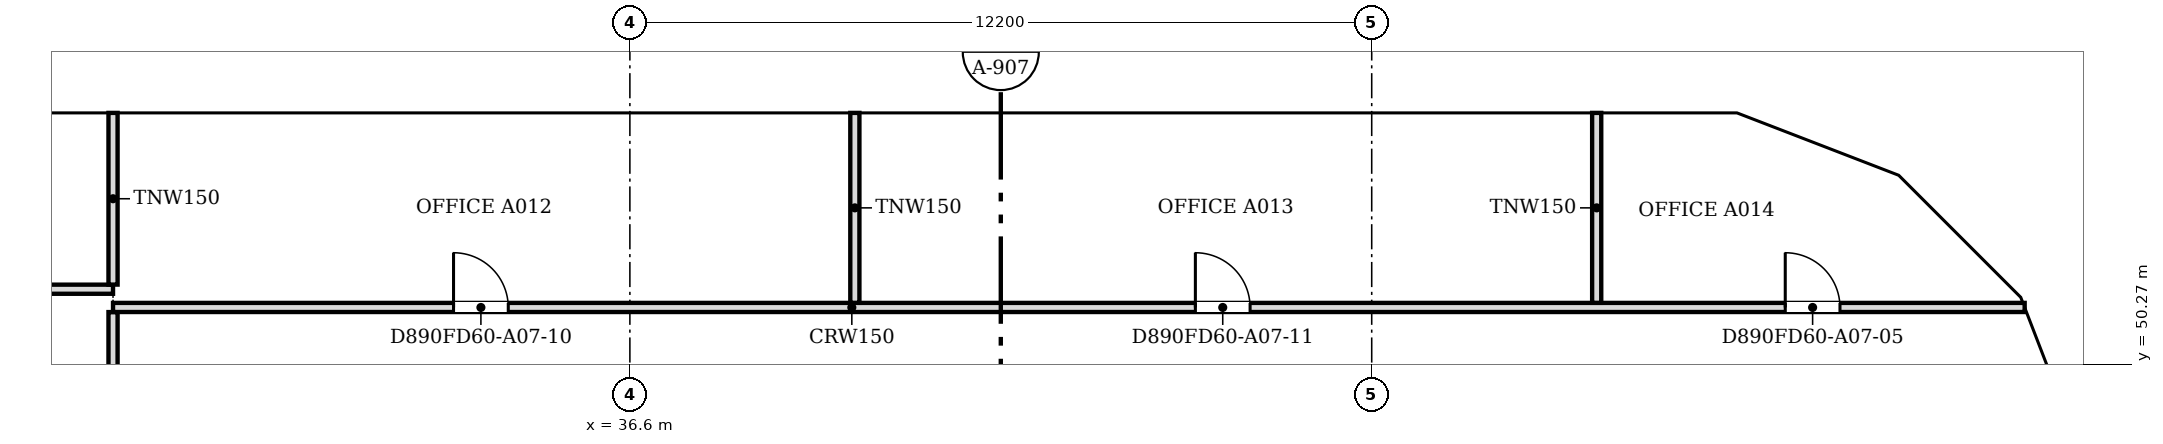
"""IFC4 building model, lengths in metres.
Left out: names, types, materials, properties, quantities, classifications, styles, units other than length and angle.
Written with IfcOpenShell. Run it as: python <this file> out.ifc"""

import sys

from ifc_helpers import new_model, si_unit, direction, frame, frame_2d, origin, place, context, subcontext, project, spatial, polyline, rectangle, outline, extrude, faceted_brep, source, transform, mapped, element, fill, save


model = new_model("IFC4")
c1 = context("Model", 3, precision=1e-05, world=origin(), true_north=direction((0.0, 1.0)))
c2 = subcontext(c1, "Body", "Model", "MODEL_VIEW")
j1 = project(units=[si_unit("LENGTHUNIT", "METRE"), si_unit("PLANEANGLEUNIT", "RADIAN")], contexts=[c1])
p1 = place(None, origin())
s1 = spatial("IfcSite", under=j1, at=p1, CompositionType="ELEMENT")
p2 = place(p1, origin())
s2 = spatial("IfcBuilding", under=s1, at=p2, CompositionType="ELEMENT")
p3 = place(p2, frame((0.0, 0.0, 80.0)))
s3 = spatial("IfcBuildingStorey", under=s2, at=p3, CompositionType="ELEMENT", Elevation=80.0)
m1 = source(origin(), c2, "Body", "Brep", [
    faceted_brep([(0.047, -0.25, 0.0), (2.997, -0.25, 3.8), (0.047, -0.25, 7.6), (0.0, -0.25, 7.541), (0.0, -0.25, 0.059), (0.093, 0.25, 7.54), (2.944, 0.25, 3.868), (2.944, 0.25, 3.732), (0.093, 0.25, 0.06), (2.997, 0.0, 3.8), (0.047, 0.0, 0.0), (0.047, 0.0, 7.6)], [[[0, 1, 2, 3, 4]], [[5, 6, 7, 8]], [[8, 7, 9, 1, 0, 10]], [[6, 5, 11, 2, 1, 9]], [[3, 2, 11]], [[10, 0, 4]], [[8, 10, 4, 3, 11, 5]], [[9, 7, 6]]]),
])
p4 = place(p3, frame((60.767, 48.71, -3.8), z_axis=(0.0, 0.0, 1.0), x_axis=(-0.359901446078, 0.932990326376, 0.0)))
e1 = element("IfcWall", 1, at=p4, inside=s3, PredefinedType="SOLIDWALL", context=c2, shape_type="MappedRepresentation", body=[
    mapped(m1, transform((0.0, 0.0, 0.0), scale=1.0)),
])
m2 = source(origin(), c2, "Body", "SweptSolid", [
    extrude(outline(polyline([(0.247, 0.665), (2.681, 3.8), (0.247, 6.935), (0.247, 0.665)])), frame((0.0, 0.26, 0.0), z_axis=(0.0, -1.0, 0.0), x_axis=(1.0, 0.0, 0.0)), (0.0, 0.0, 1.0), 0.52),
])
p5 = place(p4, origin())
e2 = element("IfcOpeningElement", 2, at=p5, cuts=e1, PredefinedType="OPENING", context=c2, shape_type="MappedRepresentation", body=[
    mapped(m2, transform((0.0, 0.0, 0.0), scale=1.0)),
])
m3 = source(origin(), c2, "Body", "Brep", [
    faceted_brep([(2.944, -0.25, 0.0), (2.997, -0.25, 0.068), (2.997, -0.25, 7.532), (2.944, -0.25, 7.6), (0.0, -0.25, 3.8), (0.053, 0.25, 3.868), (2.891, 0.25, 7.532), (2.891, 0.25, 0.068), (0.053, 0.25, 3.732), (2.944, 0.0, 0.0), (2.944, 0.0, 7.6), (0.0, 0.0, 3.8)], [[[0, 1, 2, 3, 4]], [[5, 6, 7, 8]], [[1, 0, 9]], [[10, 3, 2]], [[6, 5, 11, 4, 3, 10]], [[8, 7, 9, 0, 4, 11]], [[8, 11, 5]], [[1, 9, 7, 6, 10, 2]]]),
])
p6 = place(p3, frame((59.688, 51.506, -3.8), z_axis=(0.0, 0.0, 1.0), x_axis=(-0.707106781187, 0.707106781187, 0.0)))
e3 = element("IfcWall", 3, at=p6, inside=s3, PredefinedType="SOLIDWALL", context=c2, shape_type="MappedRepresentation", body=[
    mapped(m3, transform((0.0, 0.0, 0.0), scale=1.0)),
])
m4 = source(origin(), c2, "Body", "SweptSolid", [
    extrude(outline(polyline([(2.744, 6.934), (0.316, 3.8), (2.744, 0.666), (2.744, 6.934)])), frame((0.0, 0.26, 0.0), z_axis=(0.0, -1.0, 0.0), x_axis=(1.0, 0.0, 0.0)), (0.0, 0.0, 1.0), 0.52),
])
p7 = place(p6, origin())
e4 = element("IfcOpeningElement", 4, at=p7, cuts=e3, PredefinedType="OPENING", context=c2, shape_type="MappedRepresentation", body=[
    mapped(m4, transform((0.0, 0.0, 0.0), scale=1.0)),
])
m5 = source(origin(), c2, "Body", "Brep", [
    faceted_brep([(0.053, -0.25, 0.0), (3.003, -0.25, 3.8), (0.053, -0.25, 7.6), (0.0, -0.25, 7.532), (0.0, -0.25, 0.068), (0.106, 0.25, 7.532), (2.957, 0.25, 3.86), (2.957, 0.25, 3.74), (0.106, 0.25, 0.068), (3.003, 0.0, 3.8), (0.053, 0.0, 0.0), (0.053, 0.0, 7.6)], [[[0, 1, 2, 3, 4]], [[5, 6, 7, 8]], [[8, 7, 9, 1, 0, 10]], [[6, 5, 11, 2, 1, 9]], [[3, 2, 11]], [[10, 0, 4]], [[8, 10, 4, 3, 11, 5]], [[9, 7, 6]]]),
])
p8 = place(p3, frame((57.656, 53.569, -3.8), z_axis=(0.0, 0.0, 1.0), x_axis=(-0.933007896601, 0.359855894603, 0.0)))
e5 = element("IfcWall", 5, at=p8, inside=s3, PredefinedType="SOLIDWALL", context=c2, shape_type="MappedRepresentation", body=[
    mapped(m5, transform((0.0, 0.0, 0.0), scale=1.0)),
])
m6 = source(origin(), c2, "Body", "SweptSolid", [
    extrude(outline(polyline([(0.253, 0.665), (2.687, 3.8), (0.253, 6.935), (0.253, 0.665)])), frame((0.0, 0.26, 0.0), z_axis=(0.0, -1.0, 0.0), x_axis=(1.0, 0.0, 0.0)), (0.0, 0.0, 1.0), 0.52),
])
p9 = place(p8, origin())
e6 = element("IfcOpeningElement", 6, at=p9, cuts=e5, PredefinedType="OPENING", context=c2, shape_type="MappedRepresentation", body=[
    mapped(m6, transform((0.0, 0.0, 0.0), scale=1.0)),
])
m7 = source(origin(), c2, "Body", "Brep", [
    faceted_brep([(3.003, -0.25, 0.0), (6.053, -0.25, 3.8), (3.003, -0.25, 7.6), (0.0, -0.25, 3.8), (0.047, 0.25, 3.859), (3.003, 0.25, 7.6), (6.053, 0.25, 3.8), (3.003, 0.25, 0.0), (0.047, 0.25, 3.741), (0.0, 0.0, 3.8)], [[[0, 1, 2, 3]], [[4, 5, 6, 7, 8]], [[7, 6, 1, 0]], [[6, 5, 2, 1]], [[5, 4, 9, 3, 2]], [[8, 7, 0, 3, 9]], [[8, 9, 4]]]),
])
p10 = place(p3, frame((54.854, 54.65, -3.8), z_axis=(0.0, 0.0, 1.0), x_axis=(-1.0, 0.0, 0.0)))
e7 = element("IfcWall", 7, at=p10, inside=s3, PredefinedType="SOLIDWALL", context=c2, shape_type="MappedRepresentation", body=[
    mapped(m7, transform((0.0, 0.0, 0.0), scale=1.0)),
])
m8 = source(origin(), c2, "Body", "SweptSolid", [
    extrude(outline(polyline([(3.005, 0.401), (5.733, 3.8), (3.005, 7.199), (0.319, 3.8), (3.005, 0.401)])), frame((0.0, 0.26, 0.0), z_axis=(0.0, -1.0, 0.0), x_axis=(1.0, 0.0, 0.0)), (0.0, 0.0, 1.0), 0.52),
])
p11 = place(p10, origin())
e8 = element("IfcOpeningElement", 8, at=p11, cuts=e7, PredefinedType="OPENING", context=c2, shape_type="MappedRepresentation", body=[
    mapped(m8, transform((0.0, 0.0, 0.0), scale=1.0)),
])
m9 = source(origin(), c2, "Body", "SweptSolid", [
    extrude(outline(polyline([(3.05, 0.0), (6.1, 3.8), (3.05, 7.6), (0.0, 3.8), (3.05, 0.0)])), frame((0.0, 0.25, 0.0), z_axis=(0.0, -1.0, 0.0), x_axis=(1.0, 0.0, 0.0)), (0.0, 0.0, 1.0), 0.5),
])
p12 = place(p3, frame((48.8, 54.65, -3.8), z_axis=(0.0, 0.0, 1.0), x_axis=(-1.0, 0.0, 0.0)))
e9 = element("IfcWall", 9, at=p12, inside=s3, PredefinedType="SOLIDWALL", context=c2, shape_type="MappedRepresentation", body=[
    mapped(m9, transform((0.0, 0.0, 0.0), scale=1.0)),
])
m10 = source(origin(), c2, "Body", "SweptSolid", [
    extrude(outline(polyline([(3.05, 0.399), (5.78, 3.8), (3.05, 7.201), (0.321, 3.8), (3.05, 0.399)])), frame((0.0, 0.26, 0.0), z_axis=(0.0, -1.0, 0.0), x_axis=(1.0, 0.0, 0.0)), (0.0, 0.0, 1.0), 0.52),
])
p13 = place(p12, origin())
e10 = element("IfcOpeningElement", 10, at=p13, cuts=e9, PredefinedType="OPENING", context=c2, shape_type="MappedRepresentation", body=[
    mapped(m10, transform((0.0, 0.0, 0.0), scale=1.0)),
])
m11 = source(origin(), c2, "Body", "Brep", [
    faceted_brep([(3.05, -0.25, 0.0), (6.1, -0.25, 3.8), (6.1, -0.25, 3.8), (3.05, -0.25, 7.6), (0.0, -0.25, 3.8), (0.0, 0.25, 3.8), (3.05, 0.25, 7.6), (6.1, 0.25, 3.8), (6.1, 0.25, 3.8), (3.05, 0.25, 0.0)], [[[0, 1, 2, 3, 4]], [[5, 6, 7, 8, 9]], [[9, 8, 1, 0]], [[7, 6, 3, 2]], [[6, 5, 4, 3]], [[5, 9, 0, 4]], [[1, 8, 7, 2]]]),
])
p14 = place(p3, frame((42.7, 54.65, -3.8), z_axis=(0.0, 0.0, 1.0), x_axis=(-1.0, 0.0, 0.0)))
e11 = element("IfcWall", 11, at=p14, inside=s3, PredefinedType="SOLIDWALL", context=c2, shape_type="MappedRepresentation", body=[
    mapped(m11, transform((0.0, 0.0, 0.0), scale=1.0)),
])
p15 = place(p14, origin())
e12 = element("IfcOpeningElement", 12, at=p15, cuts=e11, PredefinedType="OPENING", context=c2, shape_type="MappedRepresentation", body=[
    mapped(m10, transform((0.0, 0.0, 0.0), scale=1.0)),
])
p16 = place(p3, frame((36.6, 54.65, -3.8), z_axis=(0.0, 0.0, 1.0), x_axis=(-1.0, 0.0, 0.0)))
e13 = element("IfcWall", 13, at=p16, inside=s3, PredefinedType="SOLIDWALL", context=c2, shape_type="MappedRepresentation", body=[
    mapped(m9, transform((0.0, 0.0, 0.0), scale=1.0)),
])
p17 = place(p16, origin())
e14 = element("IfcOpeningElement", 14, at=p17, cuts=e13, PredefinedType="OPENING", context=c2, shape_type="MappedRepresentation", body=[
    mapped(m10, transform((0.0, 0.0, 0.0), scale=1.0)),
])
p18 = place(p3, frame((30.5, 54.65, -3.8), z_axis=(0.0, 0.0, 1.0), x_axis=(-1.0, 0.0, 0.0)))
e15 = element("IfcWall", 15, at=p18, inside=s3, PredefinedType="SOLIDWALL", context=c2, shape_type="MappedRepresentation", body=[
    mapped(m9, transform((0.0, 0.0, 0.0), scale=1.0)),
])
p19 = place(p18, origin())
e16 = element("IfcOpeningElement", 16, at=p19, cuts=e15, PredefinedType="OPENING", context=c2, shape_type="MappedRepresentation", body=[
    mapped(m10, transform((0.0, 0.0, 0.0), scale=1.0)),
])
p20 = place(p2, frame((0.0, 0.0, 83.8)))
s4 = spatial("IfcBuildingStorey", under=s2, at=p20, CompositionType="ELEMENT", Elevation=83.8)
m12 = source(origin(), c2, "Body", "Brep", [
    faceted_brep([(2.95, -0.25, 0.0), (3.003, -0.25, 0.068), (3.003, -0.25, 7.532), (2.95, -0.25, 7.6), (0.0, -0.25, 3.8), (0.047, 0.25, 3.86), (2.898, 0.25, 7.532), (2.898, 0.25, 0.068), (0.047, 0.25, 3.74), (2.95, 0.0, 0.0), (2.95, 0.0, 7.6), (0.0, 0.0, 3.8)], [[[0, 1, 2, 3, 4]], [[5, 6, 7, 8]], [[1, 0, 9]], [[10, 3, 2]], [[6, 5, 11, 4, 3, 10]], [[8, 7, 9, 0, 4, 11]], [[8, 11, 5]], [[1, 9, 7, 6, 10, 2]]]),
])
p21 = place(p20, frame((60.75, 48.753, -3.8), z_axis=(0.0, 0.0, 1.0), x_axis=(-0.35992665181, 0.932980602862, 0.0)))
e17 = element("IfcWall", 17, at=p21, inside=s4, PredefinedType="SOLIDWALL", context=c2, shape_type="MappedRepresentation", body=[
    mapped(m12, transform((0.0, 0.0, 0.0), scale=1.0)),
])
m13 = source(origin(), c2, "Body", "SweptSolid", [
    extrude(outline(polyline([(2.75, 6.935), (0.316, 3.8), (2.75, 0.665), (2.75, 6.935)])), frame((0.0, 0.26, 0.0), z_axis=(0.0, -1.0, 0.0), x_axis=(1.0, 0.0, 0.0)), (0.0, 0.0, 1.0), 0.52),
])
p22 = place(p21, origin())
e18 = element("IfcOpeningElement", 18, at=p22, cuts=e17, PredefinedType="OPENING", context=c2, shape_type="MappedRepresentation", body=[
    mapped(m13, transform((0.0, 0.0, 0.0), scale=1.0)),
])
m14 = source(origin(), c2, "Body", "Brep", [
    faceted_brep([(0.053, -0.25, 0.0), (2.997, -0.25, 3.8), (0.053, -0.25, 7.6), (0.0, -0.25, 7.532), (0.0, -0.25, 0.068), (0.106, 0.25, 7.532), (2.944, 0.25, 3.868), (2.944, 0.25, 3.732), (0.106, 0.25, 0.068), (2.997, 0.0, 3.8), (0.053, 0.0, 0.0), (0.053, 0.0, 7.6)], [[[0, 1, 2, 3, 4]], [[5, 6, 7, 8]], [[8, 7, 9, 1, 0, 10]], [[6, 5, 11, 2, 1, 9]], [[3, 2, 11]], [[10, 0, 4]], [[8, 10, 4, 3, 11, 5]], [[9, 7, 6]]]),
])
p23 = place(p20, frame((59.726, 51.469, -3.8), z_axis=(0.0, 0.0, 1.0), x_axis=(-0.707106781187, 0.707106781187, 0.0)))
e19 = element("IfcWall", 19, at=p23, inside=s4, PredefinedType="SOLIDWALL", context=c2, shape_type="MappedRepresentation", body=[
    mapped(m14, transform((0.0, 0.0, 0.0), scale=1.0)),
])
m15 = source(origin(), c2, "Body", "SweptSolid", [
    extrude(outline(polyline([(0.253, 0.666), (2.681, 3.8), (0.253, 6.934), (0.253, 0.666)])), frame((0.0, 0.26, 0.0), z_axis=(0.0, -1.0, 0.0), x_axis=(1.0, 0.0, 0.0)), (0.0, 0.0, 1.0), 0.52),
])
p24 = place(p23, origin())
e20 = element("IfcOpeningElement", 20, at=p24, cuts=e19, PredefinedType="OPENING", context=c2, shape_type="MappedRepresentation", body=[
    mapped(m15, transform((0.0, 0.0, 0.0), scale=1.0)),
])
m16 = source(origin(), c2, "Body", "Brep", [
    faceted_brep([(2.95, -0.25, 0.0), (2.997, -0.25, 0.059), (2.997, -0.25, 7.541), (2.95, -0.25, 7.6), (0.0, -0.25, 3.8), (0.053, 0.25, 3.868), (2.904, 0.25, 7.54), (2.904, 0.25, 0.06), (0.053, 0.25, 3.732), (2.95, 0.0, 0.0), (2.95, 0.0, 7.6), (0.0, 0.0, 3.8)], [[[0, 1, 2, 3, 4]], [[5, 6, 7, 8]], [[1, 0, 9]], [[10, 3, 2]], [[6, 5, 11, 4, 3, 10]], [[8, 7, 9, 0, 4, 11]], [[8, 11, 5]], [[1, 9, 7, 6, 10, 2]]]),
])
p25 = place(p20, frame((57.606, 53.588, -3.8), z_axis=(0.0, 0.0, 1.0), x_axis=(-0.932990326376, 0.359901446078, 0.0)))
e21 = element("IfcWall", 21, at=p25, inside=s4, PredefinedType="SOLIDWALL", context=c2, shape_type="MappedRepresentation", body=[
    mapped(m16, transform((0.0, 0.0, 0.0), scale=1.0)),
])
p26 = place(p25, origin())
e22 = element("IfcOpeningElement", 22, at=p26, cuts=e21, PredefinedType="OPENING", context=c2, shape_type="MappedRepresentation", body=[
    mapped(m13, transform((0.0, 0.0, 0.0), scale=1.0)),
])
m17 = source(origin(), c2, "Body", "Brep", [
    faceted_brep([(0.047, -0.25, 0.0), (3.05, -0.25, 3.8), (0.047, -0.25, 7.6), (0.0, -0.25, 7.54), (0.0, -0.25, 0.06), (0.093, 0.25, 7.541), (3.05, 0.25, 3.8), (0.093, 0.25, 0.059), (0.047, 0.0, 0.0), (0.047, 0.0, 7.6)], [[[0, 1, 2, 3, 4]], [[5, 6, 7]], [[7, 6, 1, 0, 8]], [[6, 5, 9, 2, 1]], [[3, 2, 9]], [[8, 0, 4]], [[7, 8, 4, 3, 9, 5]]]),
])
p27 = place(p20, frame((54.9, 54.65, -3.8), z_axis=(0.0, 0.0, 1.0), x_axis=(-1.0, 0.0, 0.0)))
e23 = element("IfcWall", 23, at=p27, inside=s4, PredefinedType="SOLIDWALL", context=c2, shape_type="MappedRepresentation", body=[
    mapped(m17, transform((0.0, 0.0, 0.0), scale=1.0)),
])
m18 = source(origin(), c2, "Body", "SweptSolid", [
    extrude(outline(polyline([(0.247, 0.656), (2.731, 3.8), (0.247, 6.944), (0.247, 0.656)])), frame((0.0, 0.26, 0.0), z_axis=(0.0, -1.0, 0.0), x_axis=(1.0, 0.0, 0.0)), (0.0, 0.0, 1.0), 0.52),
])
p28 = place(p27, origin())
e24 = element("IfcOpeningElement", 24, at=p28, cuts=e23, PredefinedType="OPENING", context=c2, shape_type="MappedRepresentation", body=[
    mapped(m18, transform((0.0, 0.0, 0.0), scale=1.0)),
])
p29 = place(p20, frame((51.85, 54.65, -3.8), z_axis=(0.0, 0.0, 1.0), x_axis=(-1.0, 0.0, 0.0)))
e25 = element("IfcWall", 25, at=p29, inside=s4, PredefinedType="SOLIDWALL", context=c2, shape_type="MappedRepresentation", body=[
    mapped(m9, transform((0.0, 0.0, 0.0), scale=1.0)),
])
p30 = place(p29, origin())
e26 = element("IfcOpeningElement", 26, at=p30, cuts=e25, PredefinedType="OPENING", context=c2, shape_type="MappedRepresentation", body=[
    mapped(m10, transform((0.0, 0.0, 0.0), scale=1.0)),
])
p31 = place(p20, frame((45.75, 54.65, -3.8), z_axis=(0.0, 0.0, 1.0), x_axis=(-1.0, 0.0, 0.0)))
e27 = element("IfcWall", 27, at=p31, inside=s4, PredefinedType="SOLIDWALL", context=c2, shape_type="MappedRepresentation", body=[
    mapped(m9, transform((0.0, 0.0, 0.0), scale=1.0)),
])
p32 = place(p31, origin())
e28 = element("IfcOpeningElement", 28, at=p32, cuts=e27, PredefinedType="OPENING", context=c2, shape_type="MappedRepresentation", body=[
    mapped(m10, transform((0.0, 0.0, 0.0), scale=1.0)),
])
p33 = place(p20, frame((39.65, 54.65, -3.8), z_axis=(0.0, 0.0, 1.0), x_axis=(-1.0, 0.0, 0.0)))
e29 = element("IfcWall", 29, at=p33, inside=s4, PredefinedType="SOLIDWALL", context=c2, shape_type="MappedRepresentation", body=[
    mapped(m11, transform((0.0, 0.0, 0.0), scale=1.0)),
])
p34 = place(p33, origin())
e30 = element("IfcOpeningElement", 30, at=p34, cuts=e29, PredefinedType="OPENING", context=c2, shape_type="MappedRepresentation", body=[
    mapped(m10, transform((0.0, 0.0, 0.0), scale=1.0)),
])
p35 = place(p20, frame((33.55, 54.65, -3.8), z_axis=(0.0, 0.0, 1.0), x_axis=(-1.0, 0.0, 0.0)))
e31 = element("IfcWall", 31, at=p35, inside=s4, PredefinedType="SOLIDWALL", context=c2, shape_type="MappedRepresentation", body=[
    mapped(m9, transform((0.0, 0.0, 0.0), scale=1.0)),
])
p36 = place(p35, origin())
e32 = element("IfcOpeningElement", 32, at=p36, cuts=e31, PredefinedType="OPENING", context=c2, shape_type="MappedRepresentation", body=[
    mapped(m10, transform((0.0, 0.0, 0.0), scale=1.0)),
])
p37 = place(p20, frame((27.45, 54.65, -3.8), z_axis=(0.0, 0.0, 1.0), x_axis=(-1.0, 0.0, 0.0)))
e33 = element("IfcWall", 33, at=p37, inside=s4, PredefinedType="SOLIDWALL", context=c2, shape_type="MappedRepresentation", body=[
    mapped(m11, transform((0.0, 0.0, 0.0), scale=1.0)),
])
p38 = place(p37, origin())
e34 = element("IfcOpeningElement", 34, at=p38, cuts=e33, PredefinedType="OPENING", context=c2, shape_type="MappedRepresentation", body=[
    mapped(m10, transform((0.0, 0.0, 0.0), scale=1.0)),
])
p39 = place(p3, frame((28.1, 47.376, 0.0), z_axis=(0.0, 0.0, 1.0), x_axis=(0.0, 1.0, 0.0)))
e35 = element("IfcWall", 35, at=p39, inside=s3, PredefinedType="PARTITIONING", context=c2, shape_type="SweptSolid", body=[
    extrude(rectangle(XDim=3.748, YDim=0.15, at=frame_2d((1.874, 0.0))), origin(), (0.0, 0.0, 1.0), 3.067),
])
p40 = place(p3, frame((28.1, 51.2, 0.0), z_axis=(0.0, 0.0, 1.0), x_axis=(1.0, 0.0, 0.0)))
e36 = element("IfcWall", 36, at=p40, inside=s3, PredefinedType="PARTITIONING", context=c2, shape_type="SweptSolid", body=[
    extrude(rectangle(XDim=31.438, YDim=0.15, at=frame_2d((15.719, 0.0))), origin(), (0.0, 0.0, 1.0), 3.067),
])
m19 = source(origin(), c2, "Body", "SweptSolid", [
    extrude(rectangle(XDim=0.9, YDim=2.1, at=frame_2d((0.45, 1.05))), frame((0.0, 0.085, 0.0), z_axis=(0.0, -1.0, 0.0), x_axis=(1.0, 0.0, 0.0)), (0.0, 0.0, 1.0), 0.17),
])
p41 = place(p40, frame((27.501, 0.0, 0.0)))
e37 = element("IfcOpeningElement", 37, at=p41, cuts=e36, PredefinedType="OPENING", context=c2, shape_type="MappedRepresentation", body=[
    mapped(m19, transform((0.0, 0.0, 0.0), scale=1.0)),
])
p42 = place(p40, frame((5.6, 0.0, 0.0)))
e38 = element("IfcOpeningElement", 38, at=p42, cuts=e36, PredefinedType="OPENING", context=c2, shape_type="MappedRepresentation", body=[
    mapped(m19, transform((0.0, 0.0, 0.0), scale=1.0)),
])
p43 = place(p40, frame((17.8, 0.0, 0.0)))
e39 = element("IfcOpeningElement", 39, at=p43, cuts=e36, PredefinedType="OPENING", context=c2, shape_type="MappedRepresentation", body=[
    mapped(m19, transform((0.0, 0.0, 0.0), scale=1.0)),
])
for number, where, z_axis, x_axis in (
    (40, (40.3, 51.276, 0.0), (0.0, 0.0, 1.0), (0.0, 1.0, 0.0)),
    (41, (52.5, 51.276, 0.0), (0.0, 0.0, 1.0), (0.0, 1.0, 0.0)),
):
    element("IfcWall", number, at=place(p3, frame(where, z_axis=z_axis, x_axis=x_axis)), inside=s3, PredefinedType="PARTITIONING", context=c2, shape_type="SweptSolid", body=[
        extrude(rectangle(XDim=3.124, YDim=0.15, at=frame_2d((1.562, 0.0))), origin(), (0.0, 0.0, 1.0), 3.067),
    ])
p44 = place(p3, frame((13.6, 51.5, 0.0), z_axis=(0.0, 0.0, 1.0), x_axis=(1.0, 0.0, 0.0)))
e42 = element("IfcWall", 42, at=p44, inside=s3, PredefinedType="PARTITIONING", context=c2, shape_type="SweptSolid", body=[
    extrude(rectangle(XDim=14.5, YDim=0.15, at=frame_2d((7.25, 0.0))), origin(), (0.0, 0.0, 1.0), 3.067),
])
p45 = place(p44, frame((3.1, 0.0, 0.0)))
e43 = element("IfcOpeningElement", 43, at=p45, cuts=e42, PredefinedType="OPENING", context=c2, shape_type="MappedRepresentation", body=[
    mapped(m19, transform((0.0, 0.0, 0.0), scale=1.0)),
])
p46 = place(p44, frame((10.305, 0.0, 0.0)))
e44 = element("IfcOpeningElement", 44, at=p46, cuts=e42, PredefinedType="OPENING", context=c2, shape_type="MappedRepresentation", body=[
    mapped(m19, transform((0.0, 0.0, 0.0), scale=1.0)),
])
p47 = place(p3, frame((28.1, 51.576, 0.0), z_axis=(0.0, 0.0, 1.0), x_axis=(0.0, 1.0, 0.0)))
e45 = element("IfcWall", 45, at=p47, inside=s3, PredefinedType="PARTITIONING", context=c2, shape_type="SweptSolid", body=[
    extrude(rectangle(XDim=2.824, YDim=0.15, at=frame_2d((1.412, 0.0))), origin(), (0.0, 0.0, 1.0), 3.067),
])
m20 = source(origin(), c2, "Body", "SweptSolid", [
    extrude(rectangle(XDim=0.9, YDim=2.1, at=frame_2d((0.45, 1.05))), frame((0.0, 0.025, 0.0), z_axis=(0.0, -1.0, 0.0), x_axis=(1.0, 0.0, 0.0)), (0.0, 0.0, 1.0), 0.05),
])
p48 = place(p41, origin())
e46 = element("IfcDoor", 46, at=p48, inside=s3, OperationType="SINGLE_SWING_LEFT", PredefinedType="DOOR", context=c2, shape_type="MappedRepresentation", body=[
    mapped(m20, transform((0.0, 0.0, 0.0), scale=1.0)),
])
fill(e37, e46)
p49 = place(p42, origin())
e47 = element("IfcDoor", 47, at=p49, inside=s3, OperationType="SINGLE_SWING_LEFT", PredefinedType="DOOR", context=c2, shape_type="MappedRepresentation", body=[
    mapped(m20, transform((0.0, 0.0, 0.0), scale=1.0)),
])
fill(e38, e47)
p50 = place(p43, origin())
e48 = element("IfcDoor", 48, at=p50, inside=s3, OperationType="SINGLE_SWING_LEFT", PredefinedType="DOOR", context=c2, shape_type="MappedRepresentation", body=[
    mapped(m20, transform((0.0, 0.0, 0.0), scale=1.0)),
])
fill(e39, e48)
save(model, sys.argv[1])
